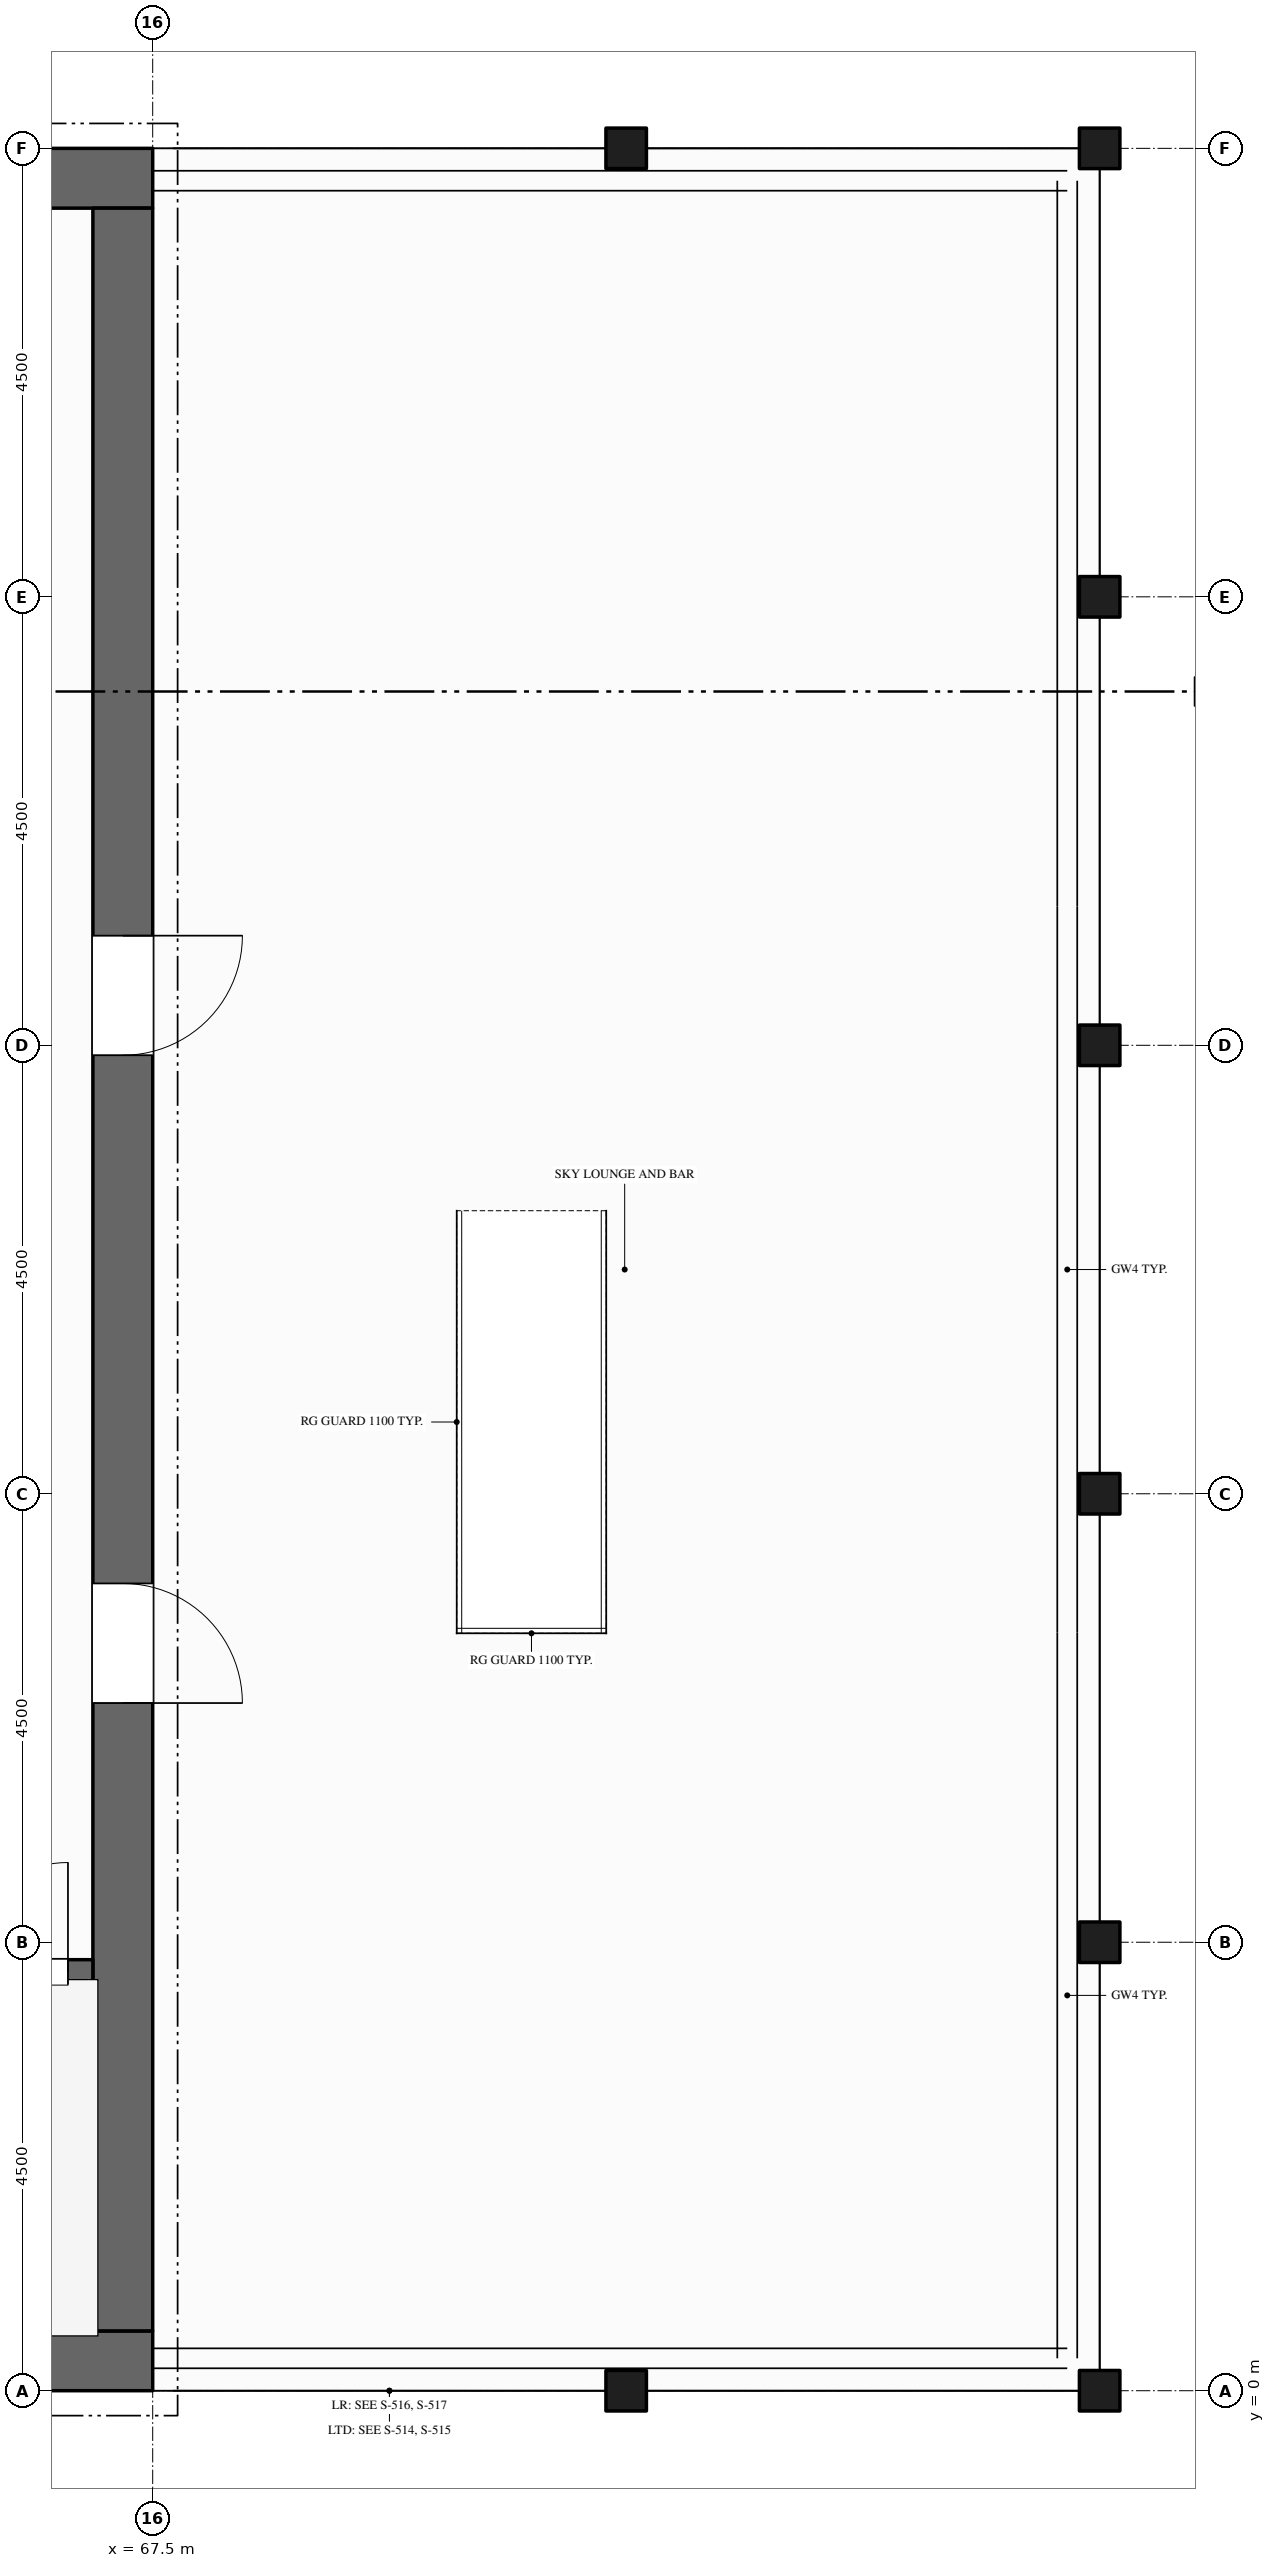
"""IFC4 building model, lengths in metres.
Left out: names, types, materials, properties, quantities, classifications, styles, units other than length and angle.
Written with IfcOpenShell. Run it as: python <this file> out.ifc"""

import sys

from ifc_helpers import new_model, si_unit, direction, frame, frame_2d, origin, place, context, subcontext, project, spatial, rectangle, extrude, element, fill, save


model = new_model("IFC4")
c1 = context("Model", 3, precision=1e-05, world=origin(), true_north=direction((0.0, 1.0)))
c2 = subcontext(c1, "Body", "Model", "MODEL_VIEW")
j1 = project(units=[si_unit("LENGTHUNIT", "METRE"), si_unit("PLANEANGLEUNIT", "RADIAN")], contexts=[c1])
p1 = place(None, origin())
s1 = spatial("IfcSite", under=j1, at=p1, CompositionType="ELEMENT")
p2 = place(p1, origin())
s2 = spatial("IfcBuilding", under=s1, at=p2, CompositionType="ELEMENT")
p3 = place(p2, frame((0.0, 0.0, 350.5)))
s3 = spatial("IfcBuildingStorey", under=s2, at=p3, CompositionType="ELEMENT", Elevation=350.5)
for number, where, z_axis, x_axis in (
    (1, (67.5, 0.3, -0.15), (0.0, 0.0, 1.0), (-1.0, 0.0, 0.0)),
    (2, (54.0, 22.2, -0.15), (0.0, 0.0, 1.0), (1.0, 0.0, 0.0)),
):
    element("IfcWall", number, at=place(p3, frame(where, z_axis=z_axis, x_axis=x_axis)), inside=s3, PredefinedType="SHEAR", context=c2, shape_type="SweptSolid", body=[
        extrude(rectangle(XDim=13.5, YDim=0.6, at=frame_2d((6.75, 0.0))), origin(), (0.0, 0.0, 1.0), 5.0),
    ])
p4 = place(p3, frame((67.2, 0.6, -0.15), z_axis=(0.0, 0.0, 1.0), x_axis=(0.0, 1.0, 0.0)))
e3 = element("IfcWall", 3, at=p4, inside=s3, PredefinedType="SHEAR", context=c2, shape_type="SweptSolid", body=[
    extrude(rectangle(XDim=21.3, YDim=0.6, at=frame_2d((10.65, 0.0))), origin(), (0.0, 0.0, 1.0), 5.0),
])
p5 = place(p4, frame((6.3, 0.0, 0.15)))
e4 = element("IfcOpeningElement", 4, at=p5, cuts=e3, PredefinedType="OPENING", context=c2, shape_type="SweptSolid", body=[
    extrude(rectangle(XDim=1.2, YDim=2.1, at=frame_2d((0.6, 1.05))), frame((0.0, 0.31, 0.0), z_axis=(0.0, -1.0, 0.0), x_axis=(1.0, 0.0, 0.0)), (0.0, 0.0, 1.0), 0.62),
])
p6 = place(p4, frame((12.8, 0.0, 0.15)))
e5 = element("IfcOpeningElement", 5, at=p6, cuts=e3, PredefinedType="OPENING", context=c2, shape_type="SweptSolid", body=[
    extrude(rectangle(XDim=1.2, YDim=2.1, at=frame_2d((0.6, 1.05))), frame((0.0, 0.31, 0.0), z_axis=(0.0, -1.0, 0.0), x_axis=(1.0, 0.0, 0.0)), (0.0, 0.0, 1.0), 0.62),
])
p7 = place(p3, frame((64.15, 4.2, 0.0), z_axis=(0.0, 0.0, 1.0), x_axis=(1.0, 0.0, 0.0)))
e6 = element("IfcWall", 6, at=p7, inside=s3, PredefinedType="SHEAR", context=c2, shape_type="SweptSolid", body=[
    extrude(rectangle(XDim=2.75, YDim=0.25, at=frame_2d((1.375, 0.0))), origin(), (0.0, 0.0, 1.0), 4.75),
])
p8 = place(p7, frame((1.4, 0.0, 0.0)))
e7 = element("IfcOpeningElement", 7, at=p8, cuts=e6, PredefinedType="OPENING", context=c2, shape_type="SweptSolid", body=[
    extrude(rectangle(XDim=1.1, YDim=2.1, at=frame_2d((0.55, 1.05))), frame((0.0, 0.135, 0.0), z_axis=(0.0, -1.0, 0.0), x_axis=(1.0, 0.0, 0.0)), (0.0, 0.0, 1.0), 0.27),
])
p9 = place(p8, origin())
e8 = element("IfcDoor", 8, at=p9, inside=s3, OperationType="SINGLE_SWING_RIGHT", PredefinedType="DOOR", context=c2, shape_type="SweptSolid", body=[
    extrude(rectangle(XDim=1.1, YDim=2.1, at=frame_2d((0.55, 1.05))), frame((0.0, 0.025, 0.0), z_axis=(0.0, -1.0, 0.0), x_axis=(1.0, 0.0, 0.0)), (0.0, 0.0, 1.0), 0.05),
])
fill(e7, e8)
p10 = place(p5, origin())
e9 = element("IfcDoor", 9, at=p10, inside=s3, OperationType="SINGLE_SWING_LEFT", PredefinedType="DOOR", context=c2, shape_type="SweptSolid", body=[
    extrude(rectangle(XDim=1.2, YDim=2.1, at=frame_2d((0.6, 1.05))), frame((0.0, 0.025, 0.0), z_axis=(0.0, -1.0, 0.0), x_axis=(1.0, 0.0, 0.0)), (0.0, 0.0, 1.0), 0.05),
])
fill(e4, e9)
p11 = place(p6, origin())
e10 = element("IfcDoor", 10, at=p11, inside=s3, OperationType="SINGLE_SWING_RIGHT", PredefinedType="DOOR", context=c2, shape_type="SweptSolid", body=[
    extrude(rectangle(XDim=1.2, YDim=2.1, at=frame_2d((0.6, 1.05))), frame((0.0, 0.025, 0.0), z_axis=(0.0, -1.0, 0.0), x_axis=(1.0, 0.0, 0.0)), (0.0, 0.0, 1.0), 0.05),
])
fill(e5, e10)
save(model, sys.argv[1])
